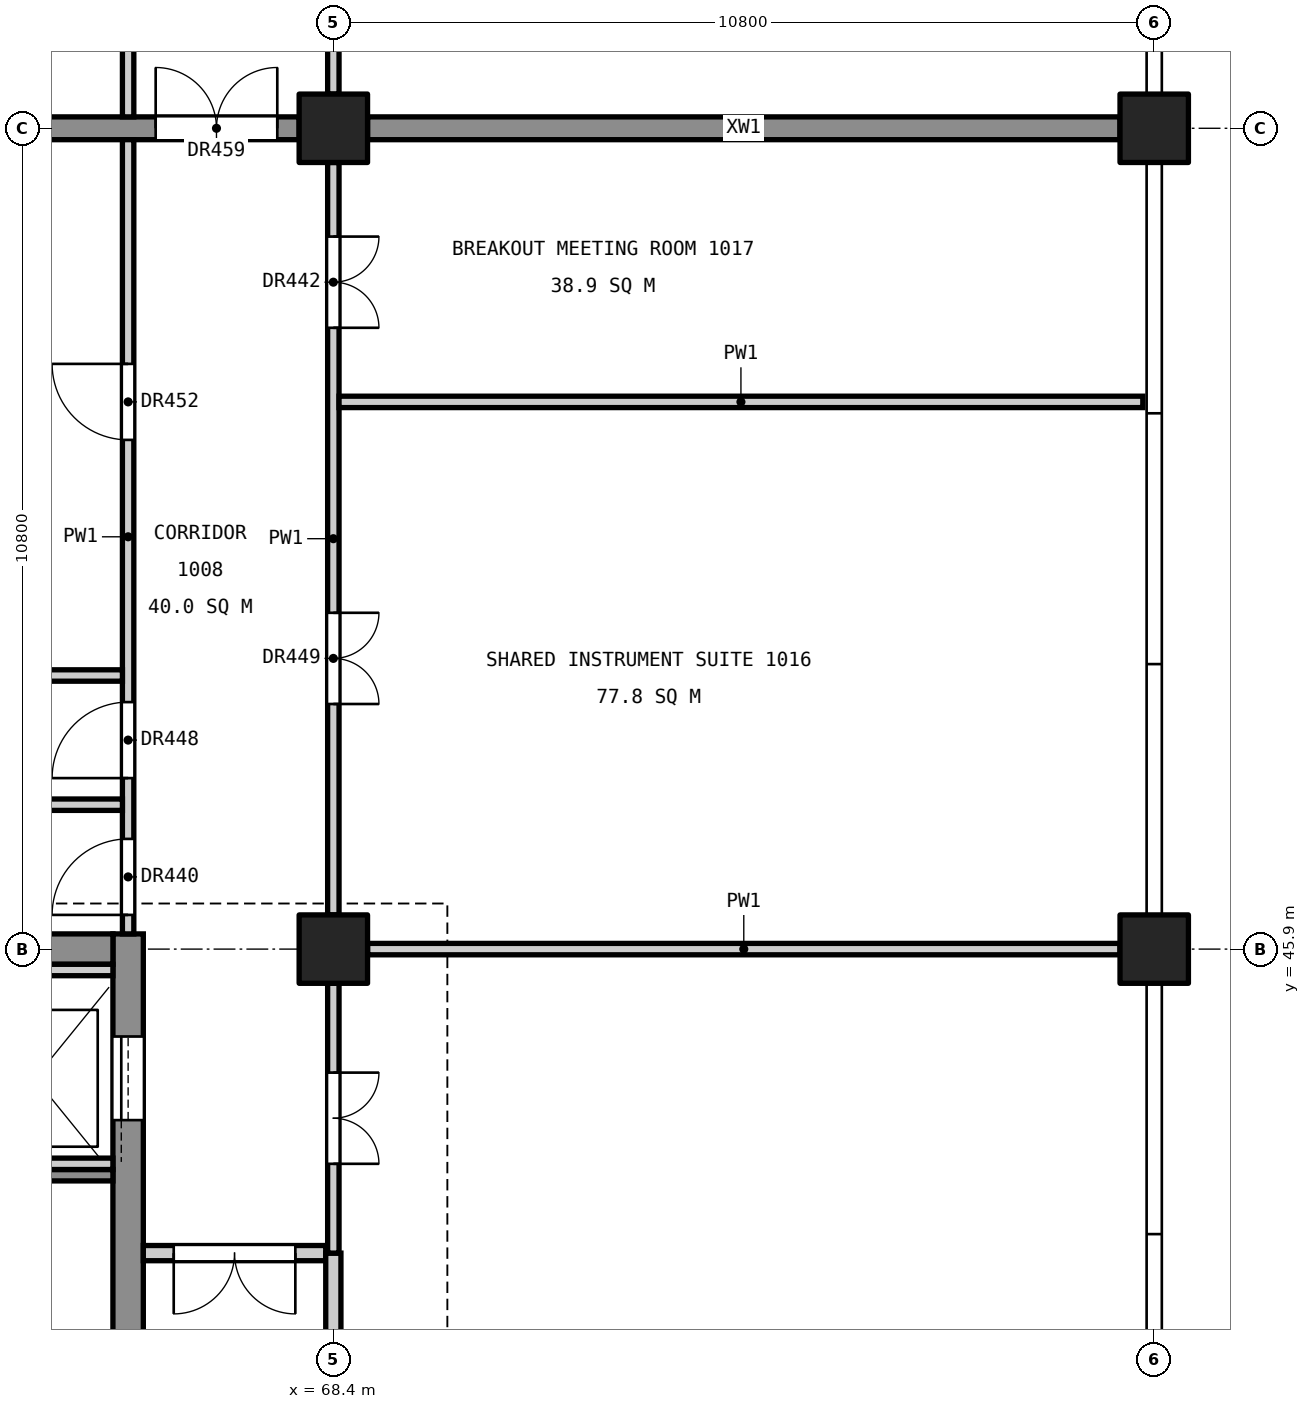
"""IFC4 building model, lengths in metres.
Left out: names, types, materials, properties, quantities, classifications, styles, units other than length and angle.
Written with IfcOpenShell. Run it as: python <this file> out.ifc"""

import sys

from ifc_helpers import new_model, si_unit, direction, frame, frame_2d, origin, origin_2d, place, context, subcontext, project, spatial, rectangle, extrude, element, fill, save


model = new_model("IFC4")
c1 = context("Model", 3, precision=1e-05, world=origin(), true_north=direction((0.0, 1.0)))
c2 = subcontext(c1, "Body", "Model", "MODEL_VIEW")
j1 = project(units=[si_unit("LENGTHUNIT", "METRE"), si_unit("PLANEANGLEUNIT", "RADIAN")], contexts=[c1])
p1 = place(None, origin())
s1 = spatial("IfcSite", under=j1, at=p1, CompositionType="ELEMENT")
p2 = place(p1, origin())
s2 = spatial("IfcBuilding", under=s1, at=p2, CompositionType="ELEMENT")
p3 = place(p2, frame((0.0, 0.0, 51.0)))
s3 = spatial("IfcBuildingStorey", under=s2, at=p3, CompositionType="ELEMENT", Elevation=51.0)
for number, where, z_axis, x_axis in (
    (1, (68.4, 45.9, 0.0), (0.0, 0.0, 1.0), (1.0, 0.0, 0.0)),
    (2, (68.4, 56.7, 0.0), (0.0, 0.0, 1.0), (1.0, 0.0, 0.0)),
    (3, (79.2, 45.9, 0.0), (0.0, 0.0, 1.0), (1.0, 0.0, 0.0)),
    (4, (79.2, 56.7, 0.0), (0.0, 0.0, 1.0), (1.0, 0.0, 0.0)),
):
    element("IfcColumn", number, at=place(p3, frame(where, z_axis=z_axis, x_axis=x_axis)), inside=s3, PredefinedType="COLUMN", context=c2, shape_type="SweptSolid", body=[
        extrude(rectangle(XDim=0.9, YDim=0.9, at=origin_2d()), origin(), (0.0, 0.0, 1.0), 4.8),
    ])
p4 = place(p3, frame((65.7, 34.9, 0.0), z_axis=(0.0, 0.0, 1.0), x_axis=(0.0, 1.0, 0.0)))
e5 = element("IfcWall", 5, at=p4, inside=s3, PredefinedType="SHEAR", context=c2, shape_type="SweptSolid", body=[
    extrude(rectangle(XDim=11.2, YDim=0.4, at=frame_2d((5.6, 0.0))), origin(), (0.0, 0.0, 1.0), 4.55),
])
p5 = place(p4, frame((0.5, 0.0, 0.0)))
e6 = element("IfcOpeningElement", 6, at=p5, cuts=e5, PredefinedType="OPENING", context=c2, shape_type="SweptSolid", body=[
    extrude(rectangle(XDim=1.4, YDim=2.1, at=frame_2d((0.7, 1.05))), frame((0.0, 0.21, 0.0), z_axis=(0.0, -1.0, 0.0), x_axis=(1.0, 0.0, 0.0)), (0.0, 0.0, 1.0), 0.42),
])
p6 = place(p4, frame((8.75, 0.0, 0.0)))
e7 = element("IfcOpeningElement", 7, at=p6, cuts=e5, PredefinedType="OPENING", context=c2, shape_type="SweptSolid", body=[
    extrude(rectangle(XDim=1.1, YDim=2.1, at=frame_2d((0.55, 1.05))), frame((0.0, 0.21, 0.0), z_axis=(0.0, -1.0, 0.0), x_axis=(1.0, 0.0, 0.0)), (0.0, 0.0, 1.0), 0.42),
])
p7 = place(p3, frame((61.4, 45.9, 0.0), z_axis=(0.0, 0.0, 1.0), x_axis=(1.0, 0.0, 0.0)))
e8 = element("IfcWall", 8, at=p7, inside=s3, PredefinedType="SHEAR", context=c2, shape_type="SweptSolid", body=[
    extrude(rectangle(XDim=4.1, YDim=0.4, at=frame_2d((2.05, 0.0))), origin(), (0.0, 0.0, 1.0), 4.55),
])
p8 = place(p3, frame((61.65, 56.7, 0.0), z_axis=(0.0, 0.0, 1.0), x_axis=(1.0, 0.0, 0.0)))
e9 = element("IfcWall", 9, at=p8, inside=s3, PredefinedType="SHEAR", context=c2, shape_type="SweptSolid", body=[
    extrude(rectangle(XDim=6.3, YDim=0.3, at=frame_2d((3.15, 0.0))), origin(), (0.0, 0.0, 1.0), 4.55),
])
p9 = place(p8, frame((4.413, 0.0, 0.0)))
e10 = element("IfcOpeningElement", 10, at=p9, cuts=e9, PredefinedType="OPENING", context=c2, shape_type="SweptSolid", body=[
    extrude(rectangle(XDim=1.6, YDim=2.1, at=frame_2d((0.8, 1.05))), frame((0.0, 0.16, 0.0), z_axis=(0.0, -1.0, 0.0), x_axis=(1.0, 0.0, 0.0)), (0.0, 0.0, 1.0), 0.32),
])
p10 = place(p3, frame((68.85, 56.7, 0.0), z_axis=(0.0, 0.0, 1.0), x_axis=(1.0, 0.0, 0.0)))
e11 = element("IfcWall", 11, at=p10, inside=s3, PredefinedType="SHEAR", context=c2, shape_type="SweptSolid", body=[
    extrude(rectangle(XDim=9.9, YDim=0.3, at=frame_2d((4.95, 0.0))), origin(), (0.0, 0.0, 1.0), 4.55),
])
p11 = place(p3, frame((61.4, 42.925, 0.0), z_axis=(0.0, 0.0, 1.0), x_axis=(1.0, 0.0, 0.0)))
e12 = element("IfcWall", 12, at=p11, inside=s3, PredefinedType="SOLIDWALL", context=c2, shape_type="SweptSolid", body=[
    extrude(rectangle(XDim=4.1, YDim=0.15, at=frame_2d((2.05, 0.0))), origin(), (0.0, 0.0, 1.0), 4.55),
])
for number, where, z_axis, x_axis in (
    (13, (63.65, 43.075, 0.0), (0.0, 0.0, 1.0), (1.0, 0.0, 0.0)),
    (14, (63.65, 45.625, 0.0), (0.0, 0.0, 1.0), (1.0, 0.0, 0.0)),
):
    element("IfcWall", number, at=place(p3, frame(where, z_axis=z_axis, x_axis=x_axis)), inside=s3, PredefinedType="SOLIDWALL", context=c2, shape_type="SweptSolid", body=[
        extrude(rectangle(XDim=1.85, YDim=0.15, at=frame_2d((0.925, 0.0))), origin(), (0.0, 0.0, 1.0), 4.8),
    ])
p12 = place(p3, frame((65.7, 46.1, 0.0), z_axis=(0.0, 0.0, 1.0), x_axis=(0.0, 1.0, 0.0)))
e15 = element("IfcWall", 15, at=p12, inside=s3, PredefinedType="PARTITIONING", context=c2, shape_type="SweptSolid", body=[
    extrude(rectangle(XDim=10.45, YDim=0.15, at=frame_2d((5.225, 0.0))), origin(), (0.0, 0.0, 1.0), 3.55),
])
p13 = place(p12, frame((0.25, 0.0, 0.0)))
e16 = element("IfcOpeningElement", 16, at=p13, cuts=e15, PredefinedType="OPENING", context=c2, shape_type="SweptSolid", body=[
    extrude(rectangle(XDim=1.0, YDim=2.1, at=frame_2d((0.5, 1.05))), frame((0.0, 0.085, 0.0), z_axis=(0.0, -1.0, 0.0), x_axis=(1.0, 0.0, 0.0)), (0.0, 0.0, 1.0), 0.17),
])
p14 = place(p12, frame((2.05, 0.0, 0.0)))
e17 = element("IfcOpeningElement", 17, at=p14, cuts=e15, PredefinedType="OPENING", context=c2, shape_type="SweptSolid", body=[
    extrude(rectangle(XDim=1.0, YDim=2.1, at=frame_2d((0.5, 1.05))), frame((0.0, 0.085, 0.0), z_axis=(0.0, -1.0, 0.0), x_axis=(1.0, 0.0, 0.0)), (0.0, 0.0, 1.0), 0.17),
])
p15 = place(p12, frame((6.5, 0.0, 0.0)))
e18 = element("IfcOpeningElement", 18, at=p15, cuts=e15, PredefinedType="OPENING", context=c2, shape_type="SweptSolid", body=[
    extrude(rectangle(XDim=1.0, YDim=2.1, at=frame_2d((0.5, 1.05))), frame((0.0, 0.085, 0.0), z_axis=(0.0, -1.0, 0.0), x_axis=(1.0, 0.0, 0.0)), (0.0, 0.0, 1.0), 0.17),
])
p16 = place(p3, frame((65.7, 56.85, 0.0), z_axis=(0.0, 0.0, 1.0), x_axis=(0.0, 1.0, 0.0)))
e19 = element("IfcWall", 19, at=p16, inside=s3, PredefinedType="PARTITIONING", context=c2, shape_type="SweptSolid", body=[
    extrude(rectangle(XDim=3.25, YDim=0.15, at=frame_2d((1.625, 0.0))), origin(), (0.0, 0.0, 1.0), 3.55),
])
p17 = place(p16, frame((1.15, 0.0, 0.0)))
e20 = element("IfcOpeningElement", 20, at=p17, cuts=e19, PredefinedType="OPENING", context=c2, shape_type="SweptSolid", body=[
    extrude(rectangle(XDim=1.0, YDim=2.1, at=frame_2d((0.5, 1.05))), frame((0.0, 0.085, 0.0), z_axis=(0.0, -1.0, 0.0), x_axis=(1.0, 0.0, 0.0)), (0.0, 0.0, 1.0), 0.17),
])
p18 = place(p3, frame((61.35, 47.8, 0.0), z_axis=(0.0, 0.0, 1.0), x_axis=(1.0, 0.0, 0.0)))
e21 = element("IfcWall", 21, at=p18, inside=s3, PredefinedType="PARTITIONING", context=c2, shape_type="SweptSolid", body=[
    extrude(rectangle(XDim=4.275, YDim=0.15, at=frame_2d((2.137, 0.0))), origin(), (0.0, 0.0, 1.0), 3.55),
])
p19 = place(p3, frame((61.35, 49.5, 0.0), z_axis=(0.0, 0.0, 1.0), x_axis=(1.0, 0.0, 0.0)))
e22 = element("IfcWall", 22, at=p19, inside=s3, PredefinedType="PARTITIONING", context=c2, shape_type="SweptSolid", body=[
    extrude(rectangle(XDim=4.275, YDim=0.15, at=frame_2d((2.137, 0.0))), origin(), (0.0, 0.0, 1.0), 3.85),
])
p20 = place(p3, frame((65.9, 41.9, 0.0), z_axis=(0.0, 0.0, 1.0), x_axis=(1.0, 0.0, 0.0)))
e23 = element("IfcWall", 23, at=p20, inside=s3, PredefinedType="PARTITIONING", context=c2, shape_type="SweptSolid", body=[
    extrude(rectangle(XDim=2.4, YDim=0.2, at=frame_2d((1.2, 0.0))), origin(), (0.0, 0.0, 1.0), 3.55),
])
p21 = place(p20, frame((0.4, 0.0, 0.0)))
e24 = element("IfcOpeningElement", 24, at=p21, cuts=e23, PredefinedType="OPENING", context=c2, shape_type="SweptSolid", body=[
    extrude(rectangle(XDim=1.6, YDim=2.1, at=frame_2d((0.8, 1.05))), frame((0.0, 0.11, 0.0), z_axis=(0.0, -1.0, 0.0), x_axis=(1.0, 0.0, 0.0)), (0.0, 0.0, 1.0), 0.22),
])
p22 = place(p3, frame((68.4, 35.55, 0.0), z_axis=(0.0, 0.0, 1.0), x_axis=(0.0, 1.0, 0.0)))
e25 = element("IfcWall", 25, at=p22, inside=s3, PredefinedType="PARTITIONING", context=c2, shape_type="SweptSolid", body=[
    extrude(rectangle(XDim=6.35, YDim=0.2, at=frame_2d((3.175, 0.0))), origin(), (0.0, 0.0, 1.0), 3.55),
])
p23 = place(p3, frame((68.4, 41.9, 0.0), z_axis=(0.0, 0.0, 1.0), x_axis=(0.0, 1.0, 0.0)))
e26 = element("IfcWall", 26, at=p23, inside=s3, PredefinedType="PARTITIONING", context=c2, shape_type="SweptSolid", body=[
    extrude(rectangle(XDim=3.55, YDim=0.15, at=frame_2d((1.775, 0.0))), origin(), (0.0, 0.0, 1.0), 3.55),
])
p24 = place(p23, frame((1.175, 0.0, 0.0)))
e27 = element("IfcOpeningElement", 27, at=p24, cuts=e26, PredefinedType="OPENING", context=c2, shape_type="SweptSolid", body=[
    extrude(rectangle(XDim=1.2, YDim=2.1, at=frame_2d((0.6, 1.05))), frame((0.0, 0.085, 0.0), z_axis=(0.0, -1.0, 0.0), x_axis=(1.0, 0.0, 0.0)), (0.0, 0.0, 1.0), 0.17),
])
p25 = place(p3, frame((68.4, 46.35, 0.0), z_axis=(0.0, 0.0, 1.0), x_axis=(0.0, 1.0, 0.0)))
e28 = element("IfcWall", 28, at=p25, inside=s3, PredefinedType="PARTITIONING", context=c2, shape_type="SweptSolid", body=[
    extrude(rectangle(XDim=9.9, YDim=0.15, at=frame_2d((4.95, 0.0))), origin(), (0.0, 0.0, 1.0), 3.55),
])
p26 = place(p25, frame((7.725, 0.0, 0.0)))
e29 = element("IfcOpeningElement", 29, at=p26, cuts=e28, PredefinedType="OPENING", context=c2, shape_type="SweptSolid", body=[
    extrude(rectangle(XDim=1.2, YDim=2.1, at=frame_2d((0.6, 1.05))), frame((0.0, 0.085, 0.0), z_axis=(0.0, -1.0, 0.0), x_axis=(1.0, 0.0, 0.0)), (0.0, 0.0, 1.0), 0.17),
])
p27 = place(p25, frame((2.775, 0.0, 0.0)))
e30 = element("IfcOpeningElement", 30, at=p27, cuts=e28, PredefinedType="OPENING", context=c2, shape_type="SweptSolid", body=[
    extrude(rectangle(XDim=1.2, YDim=2.1, at=frame_2d((0.6, 1.05))), frame((0.0, 0.085, 0.0), z_axis=(0.0, -1.0, 0.0), x_axis=(1.0, 0.0, 0.0)), (0.0, 0.0, 1.0), 0.17),
])
p28 = place(p3, frame((68.4, 57.15, 0.0), z_axis=(0.0, 0.0, 1.0), x_axis=(0.0, 1.0, 0.0)))
e31 = element("IfcWall", 31, at=p28, inside=s3, PredefinedType="PARTITIONING", context=c2, shape_type="SweptSolid", body=[
    extrude(rectangle(XDim=3.15, YDim=0.15, at=frame_2d((1.575, 0.0))), origin(), (0.0, 0.0, 1.0), 3.55),
])
p29 = place(p28, frame((0.975, 0.0, 0.0)))
e32 = element("IfcOpeningElement", 32, at=p29, cuts=e31, PredefinedType="OPENING", context=c2, shape_type="SweptSolid", body=[
    extrude(rectangle(XDim=1.2, YDim=2.1, at=frame_2d((0.6, 1.05))), frame((0.0, 0.085, 0.0), z_axis=(0.0, -1.0, 0.0), x_axis=(1.0, 0.0, 0.0)), (0.0, 0.0, 1.0), 0.17),
])
p30 = place(p3, frame((68.85, 45.9, 0.0), z_axis=(0.0, 0.0, 1.0), x_axis=(1.0, 0.0, 0.0)))
e33 = element("IfcWall", 33, at=p30, inside=s3, PredefinedType="PARTITIONING", context=c2, shape_type="SweptSolid", body=[
    extrude(rectangle(XDim=9.9, YDim=0.15, at=frame_2d((4.95, 0.0))), origin(), (0.0, 0.0, 1.0), 3.85),
])
p31 = place(p3, frame((68.475, 53.1, 0.0), z_axis=(0.0, 0.0, 1.0), x_axis=(1.0, 0.0, 0.0)))
e34 = element("IfcWall", 34, at=p31, inside=s3, PredefinedType="PARTITIONING", context=c2, shape_type="SweptSolid", body=[
    extrude(rectangle(XDim=10.575, YDim=0.15, at=frame_2d((5.288, 0.0))), origin(), (0.0, 0.0, 1.0), 3.85),
])
p32 = place(p6, origin())
e35 = element("IfcDoor", 35, at=p32, inside=s3, OperationType="SLIDING_TO_LEFT", PredefinedType="DOOR", context=c2, shape_type="SweptSolid", body=[
    extrude(rectangle(XDim=1.1, YDim=2.1, at=frame_2d((0.55, 1.05))), frame((0.0, 0.025, 0.0), z_axis=(0.0, -1.0, 0.0), x_axis=(1.0, 0.0, 0.0)), (0.0, 0.0, 1.0), 0.05),
])
fill(e7, e35)
p33 = place(p13, origin())
e36 = element("IfcDoor", 36, at=p33, inside=s3, OperationType="SINGLE_SWING_LEFT", PredefinedType="DOOR", context=c2, shape_type="SweptSolid", body=[
    extrude(rectangle(XDim=1.0, YDim=2.1, at=frame_2d((0.5, 1.05))), frame((0.0, 0.025, 0.0), z_axis=(0.0, -1.0, 0.0), x_axis=(1.0, 0.0, 0.0)), (0.0, 0.0, 1.0), 0.05),
])
fill(e16, e36)
p34 = place(p24, frame((1.2, 0.0, 0.0), z_axis=(0.0, 0.0, 1.0), x_axis=(-1.0, 0.0, 0.0)))
e37 = element("IfcDoor", 37, at=p34, inside=s3, OperationType="DOUBLE_DOOR_SINGLE_SWING", PredefinedType="DOOR", context=c2, shape_type="SweptSolid", body=[
    extrude(rectangle(XDim=1.2, YDim=2.1, at=frame_2d((0.6, 1.05))), frame((0.0, 0.025, 0.0), z_axis=(0.0, -1.0, 0.0), x_axis=(1.0, 0.0, 0.0)), (0.0, 0.0, 1.0), 0.05),
])
fill(e27, e37)
p35 = place(p26, frame((1.2, 0.0, 0.0), z_axis=(0.0, 0.0, 1.0), x_axis=(-1.0, 0.0, 0.0)))
e38 = element("IfcDoor", 38, at=p35, inside=s3, OperationType="DOUBLE_DOOR_SINGLE_SWING", PredefinedType="DOOR", context=c2, shape_type="SweptSolid", body=[
    extrude(rectangle(XDim=1.2, YDim=2.1, at=frame_2d((0.6, 1.05))), frame((0.0, 0.025, 0.0), z_axis=(0.0, -1.0, 0.0), x_axis=(1.0, 0.0, 0.0)), (0.0, 0.0, 1.0), 0.05),
])
fill(e29, e38)
p36 = place(p14, origin())
e39 = element("IfcDoor", 39, at=p36, inside=s3, OperationType="SINGLE_SWING_LEFT", PredefinedType="DOOR", context=c2, shape_type="SweptSolid", body=[
    extrude(rectangle(XDim=1.0, YDim=2.1, at=frame_2d((0.5, 1.05))), frame((0.0, 0.025, 0.0), z_axis=(0.0, -1.0, 0.0), x_axis=(1.0, 0.0, 0.0)), (0.0, 0.0, 1.0), 0.05),
])
fill(e17, e39)
p37 = place(p27, frame((1.2, 0.0, 0.0), z_axis=(0.0, 0.0, 1.0), x_axis=(-1.0, 0.0, 0.0)))
e40 = element("IfcDoor", 40, at=p37, inside=s3, OperationType="DOUBLE_DOOR_SINGLE_SWING", PredefinedType="DOOR", context=c2, shape_type="SweptSolid", body=[
    extrude(rectangle(XDim=1.2, YDim=2.1, at=frame_2d((0.6, 1.05))), frame((0.0, 0.025, 0.0), z_axis=(0.0, -1.0, 0.0), x_axis=(1.0, 0.0, 0.0)), (0.0, 0.0, 1.0), 0.05),
])
fill(e30, e40)
p38 = place(p15, origin())
e41 = element("IfcDoor", 41, at=p38, inside=s3, OperationType="SINGLE_SWING_RIGHT", PredefinedType="DOOR", context=c2, shape_type="SweptSolid", body=[
    extrude(rectangle(XDim=1.0, YDim=2.1, at=frame_2d((0.5, 1.05))), frame((0.0, 0.025, 0.0), z_axis=(0.0, -1.0, 0.0), x_axis=(1.0, 0.0, 0.0)), (0.0, 0.0, 1.0), 0.05),
])
fill(e18, e41)
p39 = place(p21, frame((1.6, 0.0, 0.0), z_axis=(0.0, 0.0, 1.0), x_axis=(-1.0, 0.0, 0.0)))
e42 = element("IfcDoor", 42, at=p39, inside=s3, OperationType="DOUBLE_DOOR_SINGLE_SWING", PredefinedType="DOOR", context=c2, shape_type="SweptSolid", body=[
    extrude(rectangle(XDim=1.6, YDim=2.1, at=frame_2d((0.8, 1.05))), frame((0.0, 0.025, 0.0), z_axis=(0.0, -1.0, 0.0), x_axis=(1.0, 0.0, 0.0)), (0.0, 0.0, 1.0), 0.05),
])
fill(e24, e42)
p40 = place(p9, origin())
e43 = element("IfcDoor", 43, at=p40, inside=s3, OperationType="DOUBLE_DOOR_SINGLE_SWING", PredefinedType="DOOR", context=c2, shape_type="SweptSolid", body=[
    extrude(rectangle(XDim=1.6, YDim=2.1, at=frame_2d((0.8, 1.05))), frame((0.0, 0.025, 0.0), z_axis=(0.0, -1.0, 0.0), x_axis=(1.0, 0.0, 0.0)), (0.0, 0.0, 1.0), 0.05),
])
fill(e10, e43)
save(model, sys.argv[1])
